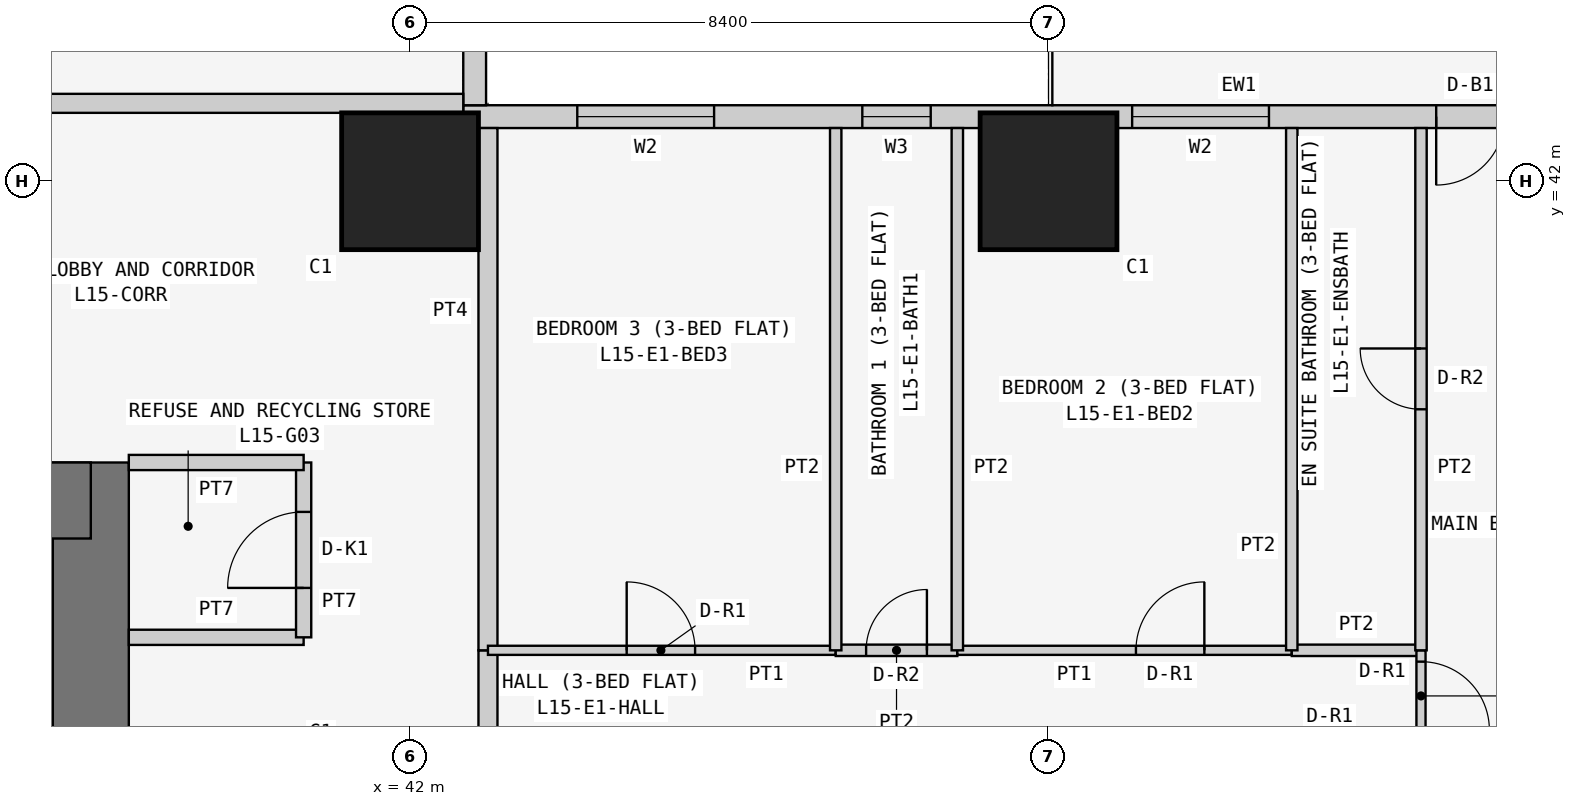
"""IFC4 building model, lengths in metres.
Left out: names, types, materials, properties, quantities, classifications, styles, units other than length and angle.
Written with IfcOpenShell. Run it as: python <this file> out.ifc"""

import sys

from ifc_helpers import new_model, si_unit, direction, frame, frame_2d, origin, origin_2d, place, context, subcontext, project, spatial, rectangle, extrude, element, fill, save


model = new_model("IFC4")
c1 = context("Model", 3, precision=1e-05, world=origin(), true_north=direction((0.0, 1.0)))
c2 = subcontext(c1, "Body", "Model", "MODEL_VIEW")
j1 = project(units=[si_unit("LENGTHUNIT", "METRE"), si_unit("PLANEANGLEUNIT", "RADIAN")], contexts=[c1])
p1 = place(None, origin())
s1 = spatial("IfcSite", under=j1, at=p1, CompositionType="ELEMENT")
p2 = place(p1, origin())
s2 = spatial("IfcBuilding", under=s1, at=p2, CompositionType="ELEMENT")
p3 = place(p2, frame((0.0, 0.0, 63.3)))
s3 = spatial("IfcBuildingStorey", under=s2, at=p3, CompositionType="ELEMENT", Elevation=63.3)
for number, where, z_axis, x_axis in (
    (1, (42.0, 42.0, 0.0), (0.0, 0.0, 1.0), (1.0, 0.0, 0.0)),
    (2, (50.4, 42.0, 0.0), (0.0, 0.0, 1.0), (1.0, 0.0, 0.0)),
):
    element("IfcColumn", number, at=place(p3, frame(where, z_axis=z_axis, x_axis=x_axis)), inside=s3, PredefinedType="COLUMN", context=c2, shape_type="SweptSolid", body=[
        extrude(rectangle(XDim=1.8, YDim=1.8, at=origin_2d()), origin(), (0.0, 0.0, 1.0), 3.6),
    ])
p4 = place(p3, frame((37.8, 21.0, 0.0), z_axis=(0.0, 0.0, 1.0), x_axis=(0.0, 1.0, 0.0)))
e3 = element("IfcWall", 3, at=p4, inside=s3, PredefinedType="SHEAR", context=c2, shape_type="SweptSolid", body=[
    extrude(rectangle(XDim=17.3, YDim=1.0, at=frame_2d((8.65, 0.0))), origin(), (0.0, 0.0, 1.0), 3.6),
])
p5 = place(p4, frame((5.2, 0.0, 0.0)))
e4 = element("IfcOpeningElement", 4, at=p5, cuts=e3, PredefinedType="OPENING", context=c2, shape_type="SweptSolid", body=[
    extrude(rectangle(XDim=1.2, YDim=2.1, at=frame_2d((0.6, 1.05))), frame((0.0, 0.51, 0.0), z_axis=(0.0, -1.0, 0.0), x_axis=(1.0, 0.0, 0.0)), (0.0, 0.0, 1.0), 1.02),
])
p6 = place(p3, frame((37.8, 37.8, 0.0), z_axis=(0.0, 0.0, 1.0), x_axis=(-1.0, 0.0, 0.0)))
e5 = element("IfcWall", 5, at=p6, inside=s3, PredefinedType="SHEAR", context=c2, shape_type="SweptSolid", body=[
    extrude(rectangle(XDim=17.3, YDim=1.0, at=frame_2d((8.65, 0.0))), origin(), (0.0, 0.0, 1.0), 3.6),
])
p7 = place(p3, frame((58.4, 42.85, 0.0), z_axis=(0.0, 0.0, 1.0), x_axis=(-1.0, 0.0, 0.0)))
e6 = element("IfcWall", 6, at=p7, inside=s3, PredefinedType="SOLIDWALL", context=c2, shape_type="SweptSolid", body=[
    extrude(rectangle(XDim=15.7, YDim=0.3, at=frame_2d((7.85, 0.0))), origin(), (0.0, 0.0, 1.0), 3.45),
])
p8 = place(p7, frame((12.4, 0.0, 0.9)))
e7 = element("IfcOpeningElement", 7, at=p8, cuts=e6, PredefinedType="OPENING", context=c2, shape_type="SweptSolid", body=[
    extrude(rectangle(XDim=1.8, YDim=1.5, at=frame_2d((0.9, 0.75))), frame((0.0, 0.16, 0.0), z_axis=(0.0, -1.0, 0.0), x_axis=(1.0, 0.0, 0.0)), (0.0, 0.0, 1.0), 0.32),
])
p9 = place(p7, frame((9.55, 0.0, 1.5)))
e8 = element("IfcOpeningElement", 8, at=p9, cuts=e6, PredefinedType="OPENING", context=c2, shape_type="SweptSolid", body=[
    extrude(rectangle(XDim=0.9, YDim=0.7, at=frame_2d((0.45, 0.35))), frame((0.0, 0.16, 0.0), z_axis=(0.0, -1.0, 0.0), x_axis=(1.0, 0.0, 0.0)), (0.0, 0.0, 1.0), 0.32),
])
p10 = place(p7, frame((5.1, 0.0, 0.9)))
e9 = element("IfcOpeningElement", 9, at=p10, cuts=e6, PredefinedType="OPENING", context=c2, shape_type="SweptSolid", body=[
    extrude(rectangle(XDim=1.8, YDim=1.5, at=frame_2d((0.9, 0.75))), frame((0.0, 0.16, 0.0), z_axis=(0.0, -1.0, 0.0), x_axis=(1.0, 0.0, 0.0)), (0.0, 0.0, 1.0), 0.32),
])
p11 = place(p7, frame((2.0, 0.0, 0.0)))
e10 = element("IfcOpeningElement", 10, at=p11, cuts=e6, PredefinedType="OPENING", context=c2, shape_type="SweptSolid", body=[
    extrude(rectangle(XDim=0.9, YDim=2.4, at=frame_2d((0.45, 1.2))), frame((0.0, 0.16, 0.0), z_axis=(0.0, -1.0, 0.0), x_axis=(1.0, 0.0, 0.0)), (0.0, 0.0, 1.0), 0.32),
])
p12 = place(p7, frame((0.7, 0.0, 0.9)))
e11 = element("IfcOpeningElement", 11, at=p12, cuts=e6, PredefinedType="OPENING", context=c2, shape_type="SweptSolid", body=[
    extrude(rectangle(XDim=1.2, YDim=1.5, at=frame_2d((0.6, 0.75))), frame((0.0, 0.16, 0.0), z_axis=(0.0, -1.0, 0.0), x_axis=(1.0, 0.0, 0.0)), (0.0, 0.0, 1.0), 0.32),
])
p13 = place(p3, frame((42.85, 43.0, 0.0), z_axis=(0.0, 0.0, 1.0), x_axis=(0.0, 1.0, 0.0)))
e12 = element("IfcWall", 12, at=p13, inside=s3, PredefinedType="SOLIDWALL", context=c2, shape_type="SweptSolid", body=[
    extrude(rectangle(XDim=15.4, YDim=0.3, at=frame_2d((7.7, 0.0))), origin(), (0.0, 0.0, 1.0), 3.45),
])
p14 = place(p13, frame((1.2, 0.0, 0.9)))
e13 = element("IfcOpeningElement", 13, at=p14, cuts=e12, PredefinedType="OPENING", context=c2, shape_type="SweptSolid", body=[
    extrude(rectangle(XDim=1.8, YDim=1.5, at=frame_2d((0.9, 0.75))), frame((0.0, 0.16, 0.0), z_axis=(0.0, -1.0, 0.0), x_axis=(1.0, 0.0, 0.0)), (0.0, 0.0, 1.0), 0.32),
])
p15 = place(p13, frame((4.95, 0.0, 1.5)))
e14 = element("IfcOpeningElement", 14, at=p15, cuts=e12, PredefinedType="OPENING", context=c2, shape_type="SweptSolid", body=[
    extrude(rectangle(XDim=0.9, YDim=0.7, at=frame_2d((0.45, 0.35))), frame((0.0, 0.16, 0.0), z_axis=(0.0, -1.0, 0.0), x_axis=(1.0, 0.0, 0.0)), (0.0, 0.0, 1.0), 0.32),
])
p16 = place(p13, frame((8.5, 0.0, 0.9)))
e15 = element("IfcOpeningElement", 15, at=p16, cuts=e12, PredefinedType="OPENING", context=c2, shape_type="SweptSolid", body=[
    extrude(rectangle(XDim=1.8, YDim=1.5, at=frame_2d((0.9, 0.75))), frame((0.0, 0.16, 0.0), z_axis=(0.0, -1.0, 0.0), x_axis=(1.0, 0.0, 0.0)), (0.0, 0.0, 1.0), 0.32),
])
p17 = place(p13, frame((12.5, 0.0, 0.0)))
e16 = element("IfcOpeningElement", 16, at=p17, cuts=e12, PredefinedType="OPENING", context=c2, shape_type="SweptSolid", body=[
    extrude(rectangle(XDim=0.9, YDim=2.4, at=frame_2d((0.45, 1.2))), frame((0.0, 0.16, 0.0), z_axis=(0.0, -1.0, 0.0), x_axis=(1.0, 0.0, 0.0)), (0.0, 0.0, 1.0), 0.32),
])
p18 = place(p13, frame((13.5, 0.0, 0.9)))
e17 = element("IfcOpeningElement", 17, at=p18, cuts=e12, PredefinedType="OPENING", context=c2, shape_type="SweptSolid", body=[
    extrude(rectangle(XDim=1.2, YDim=1.5, at=frame_2d((0.6, 0.75))), frame((0.0, 0.16, 0.0), z_axis=(0.0, -1.0, 0.0), x_axis=(1.0, 0.0, 0.0)), (0.0, 0.0, 1.0), 0.32),
])
p19 = place(p3, frame((38.3, 36.0, 0.0), z_axis=(0.0, 0.0, 1.0), x_axis=(1.0, 0.0, 0.0)))
e18 = element("IfcWall", 18, at=p19, inside=s3, PredefinedType="PARTITIONING", context=c2, shape_type="SweptSolid", body=[
    extrude(rectangle(XDim=2.3, YDim=0.2, at=frame_2d((1.15, 0.0))), origin(), (0.0, 0.0, 1.0), 3.45),
])
p20 = place(p3, frame((40.6, 36.0, 0.0), z_axis=(0.0, 0.0, 1.0), x_axis=(0.0, 1.0, 0.0)))
e19 = element("IfcWall", 19, at=p20, inside=s3, PredefinedType="PARTITIONING", context=c2, shape_type="SweptSolid", body=[
    extrude(rectangle(XDim=2.3, YDim=0.2, at=frame_2d((1.15, 0.0))), origin(), (0.0, 0.0, 1.0), 3.45),
])
p21 = place(p20, frame((0.65, 0.0, 0.0)))
e20 = element("IfcOpeningElement", 20, at=p21, cuts=e19, PredefinedType="OPENING", context=c2, shape_type="SweptSolid", body=[
    extrude(rectangle(XDim=1.0, YDim=2.1, at=frame_2d((0.5, 1.05))), frame((0.0, 0.11, 0.0), z_axis=(0.0, -1.0, 0.0), x_axis=(1.0, 0.0, 0.0)), (0.0, 0.0, 1.0), 0.22),
])
p22 = place(p3, frame((40.6, 38.3, 0.0), z_axis=(0.0, 0.0, 1.0), x_axis=(-1.0, 0.0, 0.0)))
e21 = element("IfcWall", 21, at=p22, inside=s3, PredefinedType="PARTITIONING", context=c2, shape_type="SweptSolid", body=[
    extrude(rectangle(XDim=2.3, YDim=0.2, at=frame_2d((1.15, 0.0))), origin(), (0.0, 0.0, 1.0), 3.45),
])
p23 = place(p3, frame((36.229, 43.025, 0.0), z_axis=(0.0, 0.0, 1.0), x_axis=(1.0, 0.0, 0.0)))
e22 = element("IfcWall", 22, at=p23, inside=s3, PredefinedType="PARTITIONING", context=c2, shape_type="SweptSolid", body=[
    extrude(rectangle(XDim=6.471, YDim=0.25, at=frame_2d((3.235, 0.0))), origin(), (0.0, 0.0, 1.0), 3.45),
])
p24 = place(p3, frame((43.025, 35.829, 0.0), z_axis=(0.0, 0.0, 1.0), x_axis=(0.0, -1.0, 0.0)))
e23 = element("IfcWall", 23, at=p24, inside=s3, PredefinedType="PARTITIONING", context=c2, shape_type="SweptSolid", body=[
    extrude(rectangle(XDim=1.2, YDim=0.25, at=frame_2d((0.6, 0.0))), origin(), (0.0, 0.0, 1.0), 3.45),
])
p25 = place(p3, frame((43.025, 42.7, 0.0), z_axis=(0.0, 0.0, 1.0), x_axis=(0.0, -1.0, 0.0)))
e24 = element("IfcWall", 24, at=p25, inside=s3, PredefinedType="PARTITIONING", context=c2, shape_type="SweptSolid", body=[
    extrude(rectangle(XDim=6.871, YDim=0.25, at=frame_2d((3.436, 0.0))), origin(), (0.0, 0.0, 1.0), 3.45),
])
p26 = place(p3, frame((47.6, 35.829, 0.0), z_axis=(0.0, 0.0, 1.0), x_axis=(-1.0, 0.0, 0.0)))
e25 = element("IfcWall", 25, at=p26, inside=s3, PredefinedType="PARTITIONING", context=c2, shape_type="SweptSolid", body=[
    extrude(rectangle(XDim=4.575, YDim=0.12, at=frame_2d((2.288, 0.0))), origin(), (0.0, 0.0, 1.0), 3.45),
])
p27 = place(p26, frame((1.85, 0.0, 0.0)))
e26 = element("IfcOpeningElement", 26, at=p27, cuts=e25, PredefinedType="OPENING", context=c2, shape_type="SweptSolid", body=[
    extrude(rectangle(XDim=0.9, YDim=2.1, at=frame_2d((0.45, 1.05))), frame((0.0, 0.07, 0.0), z_axis=(0.0, -1.0, 0.0), x_axis=(1.0, 0.0, 0.0)), (0.0, 0.0, 1.0), 0.14),
])
p28 = place(p3, frame((49.2, 35.829, 0.0), z_axis=(0.0, 0.0, 1.0), x_axis=(-1.0, 0.0, 0.0)))
e27 = element("IfcWall", 27, at=p28, inside=s3, PredefinedType="PARTITIONING", context=c2, shape_type="SweptSolid", body=[
    extrude(rectangle(XDim=1.6, YDim=0.15, at=frame_2d((0.8, 0.0))), origin(), (0.0, 0.0, 1.0), 3.45),
])
p29 = place(p28, frame((0.4, 0.0, 0.0)))
e28 = element("IfcOpeningElement", 28, at=p29, cuts=e27, PredefinedType="OPENING", context=c2, shape_type="SweptSolid", body=[
    extrude(rectangle(XDim=0.8, YDim=2.1, at=frame_2d((0.4, 1.05))), frame((0.0, 0.085, 0.0), z_axis=(0.0, -1.0, 0.0), x_axis=(1.0, 0.0, 0.0)), (0.0, 0.0, 1.0), 0.17),
])
p30 = place(p3, frame((53.6, 35.829, 0.0), z_axis=(0.0, 0.0, 1.0), x_axis=(-1.0, 0.0, 0.0)))
e29 = element("IfcWall", 29, at=p30, inside=s3, PredefinedType="PARTITIONING", context=c2, shape_type="SweptSolid", body=[
    extrude(rectangle(XDim=4.4, YDim=0.12, at=frame_2d((2.2, 0.0))), origin(), (0.0, 0.0, 1.0), 3.45),
])
p31 = place(p30, frame((1.15, 0.0, 0.0)))
e30 = element("IfcOpeningElement", 30, at=p31, cuts=e29, PredefinedType="OPENING", context=c2, shape_type="SweptSolid", body=[
    extrude(rectangle(XDim=0.9, YDim=2.1, at=frame_2d((0.45, 1.05))), frame((0.0, 0.07, 0.0), z_axis=(0.0, -1.0, 0.0), x_axis=(1.0, 0.0, 0.0)), (0.0, 0.0, 1.0), 0.14),
])
p32 = place(p3, frame((55.3, 35.829, 0.0), z_axis=(0.0, 0.0, 1.0), x_axis=(-1.0, 0.0, 0.0)))
e31 = element("IfcWall", 31, at=p32, inside=s3, PredefinedType="PARTITIONING", context=c2, shape_type="SweptSolid", body=[
    extrude(rectangle(XDim=1.7, YDim=0.15, at=frame_2d((0.85, 0.0))), origin(), (0.0, 0.0, 1.0), 3.45),
])
p33 = place(p3, frame((55.3, 34.629, 0.0), z_axis=(0.0, 0.0, 1.0), x_axis=(0.0, 1.0, 0.0)))
e32 = element("IfcWall", 32, at=p33, inside=s3, PredefinedType="PARTITIONING", context=c2, shape_type="SweptSolid", body=[
    extrude(rectangle(XDim=1.2, YDim=0.12, at=frame_2d((0.6, 0.0))), origin(), (0.0, 0.0, 1.0), 3.45),
])
p34 = place(p33, frame((0.151, 0.0, 0.0)))
e33 = element("IfcOpeningElement", 33, at=p34, cuts=e32, PredefinedType="OPENING", context=c2, shape_type="SweptSolid", body=[
    extrude(rectangle(XDim=0.9, YDim=2.1, at=frame_2d((0.45, 1.05))), frame((0.0, 0.07, 0.0), z_axis=(0.0, -1.0, 0.0), x_axis=(1.0, 0.0, 0.0)), (0.0, 0.0, 1.0), 0.14),
])
for number, where, z_axis, x_axis in (
    (34, (47.6, 35.829, 0.0), (0.0, 0.0, 1.0), (0.0, 1.0, 0.0)),
    (35, (49.2, 35.829, 0.0), (0.0, 0.0, 1.0), (0.0, 1.0, 0.0)),
    (36, (53.6, 35.829, 0.0), (0.0, 0.0, 1.0), (0.0, 1.0, 0.0)),
):
    element("IfcWall", number, at=place(p3, frame(where, z_axis=z_axis, x_axis=x_axis)), inside=s3, PredefinedType="PARTITIONING", context=c2, shape_type="SweptSolid", body=[
        extrude(rectangle(XDim=6.871, YDim=0.15, at=frame_2d((3.436, 0.0))), origin(), (0.0, 0.0, 1.0), 3.45),
    ])
p35 = place(p3, frame((55.3, 35.829, 0.0), z_axis=(0.0, 0.0, 1.0), x_axis=(0.0, 1.0, 0.0)))
e37 = element("IfcWall", 37, at=p35, inside=s3, PredefinedType="PARTITIONING", context=c2, shape_type="SweptSolid", body=[
    extrude(rectangle(XDim=6.871, YDim=0.15, at=frame_2d((3.436, 0.0))), origin(), (0.0, 0.0, 1.0), 3.45),
])
p36 = place(p35, frame((3.171, 0.0, 0.0)))
e38 = element("IfcOpeningElement", 38, at=p36, cuts=e37, PredefinedType="OPENING", context=c2, shape_type="SweptSolid", body=[
    extrude(rectangle(XDim=0.8, YDim=2.1, at=frame_2d((0.4, 1.05))), frame((0.0, 0.085, 0.0), z_axis=(0.0, -1.0, 0.0), x_axis=(1.0, 0.0, 0.0)), (0.0, 0.0, 1.0), 0.17),
])
p37 = place(p8, origin())
e39 = element("IfcWindow", 39, at=p37, inside=s3, PartitioningType="SINGLE_PANEL", PredefinedType="WINDOW", context=c2, shape_type="SweptSolid", body=[
    extrude(rectangle(XDim=1.8, YDim=1.5, at=frame_2d((0.9, 0.75))), frame((0.0, 0.03, 0.0), z_axis=(0.0, -1.0, 0.0), x_axis=(1.0, 0.0, 0.0)), (0.0, 0.0, 1.0), 0.06),
])
fill(e7, e39)
p38 = place(p9, origin())
e40 = element("IfcWindow", 40, at=p38, inside=s3, PartitioningType="SINGLE_PANEL", PredefinedType="WINDOW", context=c2, shape_type="SweptSolid", body=[
    extrude(rectangle(XDim=0.9, YDim=0.7, at=frame_2d((0.45, 0.35))), frame((0.0, 0.03, 0.0), z_axis=(0.0, -1.0, 0.0), x_axis=(1.0, 0.0, 0.0)), (0.0, 0.0, 1.0), 0.06),
])
fill(e8, e40)
p39 = place(p10, origin())
e41 = element("IfcWindow", 41, at=p39, inside=s3, PartitioningType="SINGLE_PANEL", PredefinedType="WINDOW", context=c2, shape_type="SweptSolid", body=[
    extrude(rectangle(XDim=1.8, YDim=1.5, at=frame_2d((0.9, 0.75))), frame((0.0, 0.03, 0.0), z_axis=(0.0, -1.0, 0.0), x_axis=(1.0, 0.0, 0.0)), (0.0, 0.0, 1.0), 0.06),
])
fill(e9, e41)
p40 = place(p11, origin())
e42 = element("IfcDoor", 42, at=p40, inside=s3, OperationType="SINGLE_SWING_RIGHT", PredefinedType="DOOR", context=c2, shape_type="SweptSolid", body=[
    extrude(rectangle(XDim=0.9, YDim=2.4, at=frame_2d((0.45, 1.2))), frame((0.0, 0.025, 0.0), z_axis=(0.0, -1.0, 0.0), x_axis=(1.0, 0.0, 0.0)), (0.0, 0.0, 1.0), 0.05),
])
fill(e10, e42)
p41 = place(p21, origin())
e43 = element("IfcDoor", 43, at=p41, inside=s3, OperationType="SINGLE_SWING_LEFT", PredefinedType="DOOR", context=c2, shape_type="SweptSolid", body=[
    extrude(rectangle(XDim=1.0, YDim=2.1, at=frame_2d((0.5, 1.05))), frame((0.0, 0.025, 0.0), z_axis=(0.0, -1.0, 0.0), x_axis=(1.0, 0.0, 0.0)), (0.0, 0.0, 1.0), 0.05),
])
fill(e20, e43)
p42 = place(p27, frame((0.9, 0.0, 0.0), z_axis=(0.0, 0.0, 1.0), x_axis=(-1.0, 0.0, 0.0)))
e44 = element("IfcDoor", 44, at=p42, inside=s3, OperationType="SINGLE_SWING_LEFT", PredefinedType="DOOR", context=c2, shape_type="SweptSolid", body=[
    extrude(rectangle(XDim=0.9, YDim=2.1, at=frame_2d((0.45, 1.05))), frame((0.0, 0.025, 0.0), z_axis=(0.0, -1.0, 0.0), x_axis=(1.0, 0.0, 0.0)), (0.0, 0.0, 1.0), 0.05),
])
fill(e26, e44)
p43 = place(p29, frame((0.8, 0.0, 0.0), z_axis=(0.0, 0.0, 1.0), x_axis=(-1.0, 0.0, 0.0)))
e45 = element("IfcDoor", 45, at=p43, inside=s3, OperationType="SINGLE_SWING_RIGHT", PredefinedType="DOOR", context=c2, shape_type="SweptSolid", body=[
    extrude(rectangle(XDim=0.8, YDim=2.1, at=frame_2d((0.4, 1.05))), frame((0.0, 0.025, 0.0), z_axis=(0.0, -1.0, 0.0), x_axis=(1.0, 0.0, 0.0)), (0.0, 0.0, 1.0), 0.05),
])
fill(e28, e45)
p44 = place(p31, frame((0.9, 0.0, 0.0), z_axis=(0.0, 0.0, 1.0), x_axis=(-1.0, 0.0, 0.0)))
e46 = element("IfcDoor", 46, at=p44, inside=s3, OperationType="SINGLE_SWING_RIGHT", PredefinedType="DOOR", context=c2, shape_type="SweptSolid", body=[
    extrude(rectangle(XDim=0.9, YDim=2.1, at=frame_2d((0.45, 1.05))), frame((0.0, 0.025, 0.0), z_axis=(0.0, -1.0, 0.0), x_axis=(1.0, 0.0, 0.0)), (0.0, 0.0, 1.0), 0.05),
])
fill(e30, e46)
p45 = place(p34, frame((0.9, 0.0, 0.0), z_axis=(0.0, 0.0, 1.0), x_axis=(-1.0, 0.0, 0.0)))
e47 = element("IfcDoor", 47, at=p45, inside=s3, OperationType="SINGLE_SWING_RIGHT", PredefinedType="DOOR", context=c2, shape_type="SweptSolid", body=[
    extrude(rectangle(XDim=0.9, YDim=2.1, at=frame_2d((0.45, 1.05))), frame((0.0, 0.025, 0.0), z_axis=(0.0, -1.0, 0.0), x_axis=(1.0, 0.0, 0.0)), (0.0, 0.0, 1.0), 0.05),
])
fill(e33, e47)
p46 = place(p36, origin())
e48 = element("IfcDoor", 48, at=p46, inside=s3, OperationType="SINGLE_SWING_RIGHT", PredefinedType="DOOR", context=c2, shape_type="SweptSolid", body=[
    extrude(rectangle(XDim=0.8, YDim=2.1, at=frame_2d((0.4, 1.05))), frame((0.0, 0.025, 0.0), z_axis=(0.0, -1.0, 0.0), x_axis=(1.0, 0.0, 0.0)), (0.0, 0.0, 1.0), 0.05),
])
fill(e38, e48)
save(model, sys.argv[1])
